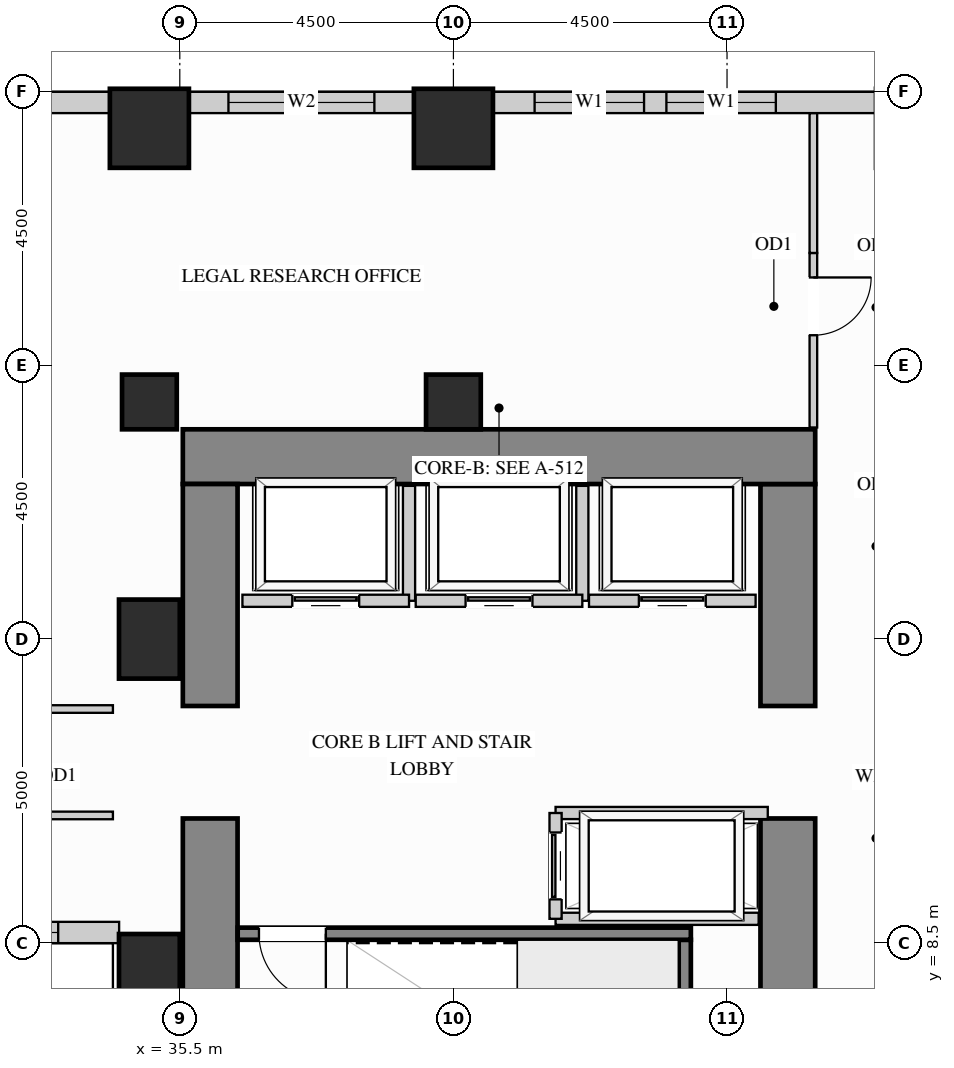
"""IFC4 building model, lengths in metres.
Left out: names, types, materials, properties, quantities, classifications, styles, units other than length and angle.
Written with IfcOpenShell. Run it as: python <this file> out.ifc"""

import sys

from ifc_helpers import new_model, si_unit, direction, frame, frame_2d, origin, origin_2d, place, context, subcontext, project, spatial, rectangle, extrude, source, transform, mapped, element, fill, save


model = new_model("IFC4")
c1 = context("Model", 3, precision=1e-05, world=origin(), true_north=direction((0.0, 1.0)))
c2 = subcontext(c1, "Body", "Model", "MODEL_VIEW")
j1 = project(units=[si_unit("LENGTHUNIT", "METRE"), si_unit("PLANEANGLEUNIT", "RADIAN")], contexts=[c1])
p1 = place(None, origin())
s1 = spatial("IfcSite", under=j1, at=p1, CompositionType="ELEMENT")
p2 = place(p1, origin())
s2 = spatial("IfcBuilding", under=s1, at=p2, CompositionType="ELEMENT")
p3 = place(p2, frame((0.0, 0.0, 69.3)))
s3 = spatial("IfcBuildingStorey", under=s2, at=p3, CompositionType="ELEMENT", Elevation=69.3)
m1 = source(origin(), c2, "Body", "SweptSolid", [
    extrude(rectangle(XDim=0.9, YDim=0.9, at=origin_2d()), origin(), (0.0, 0.0, 1.0), 3.32),
])
for number, where, z_axis, x_axis in (
    (1, (35.0, 17.4, 0.0), (0.0, 0.0, 1.0), (1.0, 0.0, 0.0)),
    (2, (40.0, 17.4, 0.0), (0.0, 0.0, 1.0), (1.0, 0.0, 0.0)),
):
    element("IfcColumn", number, at=place(p3, frame(where, z_axis=z_axis, x_axis=x_axis)), inside=s3, PredefinedType="COLUMN", context=c2, shape_type="MappedRepresentation", body=[
        mapped(m1, transform((0.0, 0.0, 0.0), x_axis=(1.0, 0.0, 0.0), y_axis=(0.0, 1.0, 0.0), z_axis=(0.0, 0.0, 1.0))),
    ])
m2 = source(origin(), c2, "Body", "SweptSolid", [
    extrude(rectangle(XDim=1.0, YDim=1.3, at=origin_2d()), origin(), (0.0, 0.0, 1.0), 3.32),
])
for number, where, z_axis, x_axis in (
    (3, (35.0, 13.5, 0.0), (0.0, 0.0, 1.0), (1.0, 0.0, 0.0)),
    (4, (35.0, 8.0, 0.0), (0.0, 0.0, 1.0), (1.0, 0.0, 0.0)),
):
    element("IfcColumn", number, at=place(p3, frame(where, z_axis=z_axis, x_axis=x_axis)), inside=s3, PredefinedType="COLUMN", context=c2, shape_type="MappedRepresentation", body=[
        mapped(m2, transform((0.0, 0.0, 0.0), x_axis=(1.0, 0.0, 0.0), y_axis=(0.0, 1.0, 0.0), z_axis=(0.0, 0.0, 1.0))),
    ])
m3 = source(origin(), c2, "Body", "SweptSolid", [
    extrude(rectangle(XDim=1.3, YDim=1.3, at=origin_2d()), origin(), (0.0, 0.0, 1.0), 3.32),
])
for number, where, z_axis, x_axis in (
    (5, (35.0, 21.9, 0.0), (0.0, 0.0, 1.0), (1.0, 0.0, 0.0)),
    (6, (40.0, 21.9, 0.0), (0.0, 0.0, 1.0), (1.0, 0.0, 0.0)),
):
    element("IfcColumn", number, at=place(p3, frame(where, z_axis=z_axis, x_axis=x_axis)), inside=s3, PredefinedType="COLUMN", context=c2, shape_type="MappedRepresentation", body=[
        mapped(m3, transform((0.0, 0.0, 0.0), x_axis=(1.0, 0.0, 0.0), y_axis=(0.0, 1.0, 0.0), z_axis=(0.0, 0.0, 1.0))),
    ])
m4 = source(origin(), c2, "Body", "SweptSolid", [
    extrude(rectangle(XDim=5.6, YDim=0.9, at=frame_2d((2.8, 0.0))), origin(), (0.0, 0.0, 1.0), 3.32),
])
p4 = place(p3, frame((45.5, 4.95, 0.0), z_axis=(0.0, 0.0, 1.0), x_axis=(0.0, 1.0, 0.0)))
e7 = element("IfcWall", 7, at=p4, inside=s3, PredefinedType="SHEAR", context=c2, shape_type="MappedRepresentation", body=[
    mapped(m4, transform((0.0, 0.0, 0.0), x_axis=(1.0, 0.0, 0.0), y_axis=(0.0, 1.0, 0.0), z_axis=(0.0, 0.0, 1.0))),
])
m5 = source(origin(), c2, "Body", "SweptSolid", [
    extrude(rectangle(XDim=3.65, YDim=0.9, at=frame_2d((1.825, 0.0))), origin(), (0.0, 0.0, 1.0), 3.32),
])
p5 = place(p3, frame((45.5, 12.4, 0.0), z_axis=(0.0, 0.0, 1.0), x_axis=(0.0, 1.0, 0.0)))
e8 = element("IfcWall", 8, at=p5, inside=s3, PredefinedType="SHEAR", context=c2, shape_type="MappedRepresentation", body=[
    mapped(m5, transform((0.0, 0.0, 0.0), x_axis=(1.0, 0.0, 0.0), y_axis=(0.0, 1.0, 0.0), z_axis=(0.0, 0.0, 1.0))),
])
m6 = source(origin(), c2, "Body", "SweptSolid", [
    extrude(rectangle(XDim=10.4, YDim=0.9, at=frame_2d((5.2, 0.0))), origin(), (0.0, 0.0, 1.0), 3.32),
])
p6 = place(p3, frame((35.55, 16.5, 0.0), z_axis=(0.0, 0.0, 1.0), x_axis=(1.0, 0.0, 0.0)))
e9 = element("IfcWall", 9, at=p6, inside=s3, PredefinedType="SHEAR", context=c2, shape_type="MappedRepresentation", body=[
    mapped(m6, transform((0.0, 0.0, 0.0), x_axis=(1.0, 0.0, 0.0), y_axis=(0.0, 1.0, 0.0), z_axis=(0.0, 0.0, 1.0))),
])
p7 = place(p3, frame((36.0, 4.95, 0.0), z_axis=(0.0, 0.0, 1.0), x_axis=(0.0, 1.0, 0.0)))
e10 = element("IfcWall", 10, at=p7, inside=s3, PredefinedType="SHEAR", context=c2, shape_type="MappedRepresentation", body=[
    mapped(m4, transform((0.0, 0.0, 0.0), x_axis=(1.0, 0.0, 0.0), y_axis=(0.0, 1.0, 0.0), z_axis=(0.0, 0.0, 1.0))),
])
p8 = place(p3, frame((36.0, 12.4, 0.0), z_axis=(0.0, 0.0, 1.0), x_axis=(0.0, 1.0, 0.0)))
e11 = element("IfcWall", 11, at=p8, inside=s3, PredefinedType="SHEAR", context=c2, shape_type="MappedRepresentation", body=[
    mapped(m5, transform((0.0, 0.0, 0.0), x_axis=(1.0, 0.0, 0.0), y_axis=(0.0, 1.0, 0.0), z_axis=(0.0, 0.0, 1.0))),
])
p9 = place(p3, frame((30.998, 8.675, 0.0), z_axis=(0.0, 0.0, 1.0), x_axis=(1.0, 0.0, 0.0)))
e12 = element("IfcWall", 12, at=p9, inside=s3, PredefinedType="SOLIDWALL", context=c2, shape_type="SweptSolid", body=[
    extrude(rectangle(XDim=3.504, YDim=0.35, at=frame_2d((1.752, 0.0))), origin(), (0.0, 0.0, 1.0), 3.305),
])
p10 = place(p9, frame((1.002, 0.0, 0.78)))
e13 = element("IfcOpeningElement", 13, at=p10, cuts=e12, PredefinedType="OPENING", context=c2, shape_type="SweptSolid", body=[
    extrude(rectangle(XDim=1.5, YDim=2.0, at=frame_2d((0.75, 1.0))), frame((0.0, 0.185, 0.0), z_axis=(0.0, -1.0, 0.0), x_axis=(1.0, 0.0, 0.0)), (0.0, 0.0, 1.0), 0.37),
])
p11 = place(p3, frame((46.952, 22.325, 0.0), z_axis=(0.0, 0.0, 1.0), x_axis=(-1.0, 0.0, 0.0)))
e14 = element("IfcWall", 14, at=p11, inside=s3, PredefinedType="SOLIDWALL", context=c2, shape_type="SweptSolid", body=[
    extrude(rectangle(XDim=6.304, YDim=0.35, at=frame_2d((3.152, 0.0))), origin(), (0.0, 0.0, 1.0), 2.45),
])
p12 = place(p11, frame((1.649, 0.0, 0.78)))
e15 = element("IfcOpeningElement", 15, at=p12, cuts=e14, PredefinedType="OPENING", context=c2, shape_type="SweptSolid", body=[
    extrude(rectangle(XDim=1.8, YDim=1.49, at=frame_2d((0.9, 0.745))), frame((0.0, 0.185, 0.0), z_axis=(0.0, -1.0, 0.0), x_axis=(1.0, 0.0, 0.0)), (0.0, 0.0, 1.0), 0.37),
])
p13 = place(p11, frame((3.817, 0.0, 0.78)))
e16 = element("IfcOpeningElement", 16, at=p13, cuts=e14, PredefinedType="OPENING", context=c2, shape_type="SweptSolid", body=[
    extrude(rectangle(XDim=1.8, YDim=1.49, at=frame_2d((0.9, 0.745))), frame((0.0, 0.185, 0.0), z_axis=(0.0, -1.0, 0.0), x_axis=(1.0, 0.0, 0.0)), (0.0, 0.0, 1.0), 0.37),
])
p14 = place(p3, frame((39.352, 22.325, 0.0), z_axis=(0.0, 0.0, 1.0), x_axis=(-1.0, 0.0, 0.0)))
e17 = element("IfcWall", 17, at=p14, inside=s3, PredefinedType="SOLIDWALL", context=c2, shape_type="SweptSolid", body=[
    extrude(rectangle(XDim=3.704, YDim=0.35, at=frame_2d((1.852, 0.0))), origin(), (0.0, 0.0, 1.0), 2.45),
])
p15 = place(p14, frame((0.652, 0.0, 0.78)))
e18 = element("IfcOpeningElement", 18, at=p15, cuts=e17, PredefinedType="OPENING", context=c2, shape_type="SweptSolid", body=[
    extrude(rectangle(XDim=2.4, YDim=1.49, at=frame_2d((1.2, 0.745))), frame((0.0, 0.185, 0.0), z_axis=(0.0, -1.0, 0.0), x_axis=(1.0, 0.0, 0.0)), (0.0, 0.0, 1.0), 0.37),
])
p16 = place(p3, frame((34.352, 22.325, 0.0), z_axis=(0.0, 0.0, 1.0), x_axis=(-1.0, 0.0, 0.0)))
e19 = element("IfcWall", 19, at=p16, inside=s3, PredefinedType="SOLIDWALL", context=c2, shape_type="SweptSolid", body=[
    extrude(rectangle(XDim=14.854, YDim=0.35, at=frame_2d((7.427, 0.0))), origin(), (0.0, 0.0, 1.0), 3.305),
])
p17 = place(p16, frame((4.058, 0.0, 0.78)))
e20 = element("IfcOpeningElement", 20, at=p17, cuts=e19, PredefinedType="OPENING", context=c2, shape_type="SweptSolid", body=[
    extrude(rectangle(XDim=1.5, YDim=2.0, at=frame_2d((0.75, 1.0))), frame((0.0, 0.185, 0.0), z_axis=(0.0, -1.0, 0.0), x_axis=(1.0, 0.0, 0.0)), (0.0, 0.0, 1.0), 0.37),
])
p18 = place(p16, frame((9.296, 0.0, 0.78)))
e21 = element("IfcOpeningElement", 21, at=p18, cuts=e19, PredefinedType="OPENING", context=c2, shape_type="SweptSolid", body=[
    extrude(rectangle(XDim=1.5, YDim=2.0, at=frame_2d((0.75, 1.0))), frame((0.0, 0.185, 0.0), z_axis=(0.0, -1.0, 0.0), x_axis=(1.0, 0.0, 0.0)), (0.0, 0.0, 1.0), 0.37),
])
p19 = place(p3, frame((45.92, 16.98, 0.0), z_axis=(0.0, 0.0, 1.0), x_axis=(0.0, 1.0, 0.0)))
e22 = element("IfcWall", 22, at=p19, inside=s3, PredefinedType="PARTITIONING", context=c2, shape_type="SweptSolid", body=[
    extrude(rectangle(XDim=2.87, YDim=0.125, at=frame_2d((1.435, 0.0))), origin(), (0.0, 0.0, 1.0), 3.305),
])
p20 = place(p19, frame((1.517, 0.0, 0.0)))
e23 = element("IfcOpeningElement", 23, at=p20, cuts=e22, PredefinedType="OPENING", context=c2, shape_type="SweptSolid", body=[
    extrude(rectangle(XDim=0.95, YDim=2.15, at=frame_2d((0.475, 1.075))), frame((0.0, 0.073, 0.0), z_axis=(0.0, -1.0, 0.0), x_axis=(1.0, 0.0, 0.0)), (0.0, 0.0, 1.0), 0.145),
])
m7 = source(origin(), c2, "Body", "SweptSolid", [
    extrude(rectangle(XDim=2.298, YDim=0.125, at=frame_2d((1.149, 0.0))), origin(), (0.0, 0.0, 1.0), 3.305),
])
p21 = place(p3, frame((45.92, 19.85, 0.0), z_axis=(0.0, 0.0, 1.0), x_axis=(0.0, 1.0, 0.0)))
e24 = element("IfcWall", 24, at=p21, inside=s3, PredefinedType="PARTITIONING", context=c2, shape_type="MappedRepresentation", body=[
    mapped(m7, transform((0.0, 0.0, 0.0), x_axis=(1.0, 0.0, 0.0), y_axis=(0.0, 1.0, 0.0), z_axis=(0.0, 0.0, 1.0))),
])
p22 = place(p3, frame((29.85, 12.35, 0.0), z_axis=(0.0, 0.0, 1.0), x_axis=(1.0, 0.0, 0.0)))
e25 = element("IfcWall", 25, at=p22, inside=s3, PredefinedType="PARTITIONING", context=c2, shape_type="SweptSolid", body=[
    extrude(rectangle(XDim=4.55, YDim=0.125, at=frame_2d((2.275, 0.0))), origin(), (0.0, 0.0, 1.0), 3.305),
])
p23 = place(p22, frame((1.8, 0.0, 0.0)))
e26 = element("IfcOpeningElement", 26, at=p23, cuts=e25, PredefinedType="OPENING", context=c2, shape_type="SweptSolid", body=[
    extrude(rectangle(XDim=0.95, YDim=2.15, at=frame_2d((0.475, 1.075))), frame((0.0, 0.073, 0.0), z_axis=(0.0, -1.0, 0.0), x_axis=(1.0, 0.0, 0.0)), (0.0, 0.0, 1.0), 0.145),
])
p24 = place(p3, frame((29.85, 10.6, 0.0), z_axis=(0.0, 0.0, 1.0), x_axis=(1.0, 0.0, 0.0)))
e27 = element("IfcWall", 27, at=p24, inside=s3, PredefinedType="PARTITIONING", context=c2, shape_type="SweptSolid", body=[
    extrude(rectangle(XDim=4.55, YDim=0.125, at=frame_2d((2.275, 0.0))), origin(), (0.0, 0.0, 1.0), 3.305),
])
p25 = place(p24, frame((1.8, 0.0, 0.0)))
e28 = element("IfcOpeningElement", 28, at=p25, cuts=e27, PredefinedType="OPENING", context=c2, shape_type="SweptSolid", body=[
    extrude(rectangle(XDim=0.95, YDim=2.15, at=frame_2d((0.475, 1.075))), frame((0.0, 0.073, 0.0), z_axis=(0.0, -1.0, 0.0), x_axis=(1.0, 0.0, 0.0)), (0.0, 0.0, 1.0), 0.145),
])
m8 = source(origin(), c2, "Body", "SweptSolid", [
    extrude(rectangle(XDim=1.89, YDim=0.2, at=frame_2d((0.945, 0.0))), origin(), (0.0, 0.0, 1.0), 3.305),
])
p26 = place(p3, frame((39.27, 14.13, 0.0), z_axis=(0.0, 0.0, 1.0), x_axis=(0.0, 1.0, 0.0)))
e29 = element("IfcWall", 29, at=p26, inside=s3, PredefinedType="PARTITIONING", context=c2, shape_type="MappedRepresentation", body=[
    mapped(m8, transform((0.0, 0.0, 0.0), x_axis=(1.0, 0.0, 0.0), y_axis=(0.0, 1.0, 0.0), z_axis=(0.0, 0.0, 1.0))),
])
p27 = place(p3, frame((36.53, 14.13, 0.0), z_axis=(0.0, 0.0, 1.0), x_axis=(1.0, 0.0, 0.0)))
e30 = element("IfcWall", 30, at=p27, inside=s3, PredefinedType="PARTITIONING", context=c2, shape_type="SweptSolid", body=[
    extrude(rectangle(XDim=2.74, YDim=0.2, at=frame_2d((1.37, 0.0))), origin(), (0.0, 0.0, 1.0), 3.305),
])
p28 = place(p27, frame((0.82, 0.0, 0.0)))
e31 = element("IfcOpeningElement", 31, at=p28, cuts=e30, PredefinedType="OPENING", context=c2, shape_type="SweptSolid", body=[
    extrude(rectangle(XDim=1.1, YDim=2.2, at=frame_2d((0.55, 1.1))), frame((0.0, 0.11, 0.0), z_axis=(0.0, -1.0, 0.0), x_axis=(1.0, 0.0, 0.0)), (0.0, 0.0, 1.0), 0.22),
])
p29 = place(p3, frame((42.12, 14.13, 0.0), z_axis=(0.0, 0.0, 1.0), x_axis=(0.0, 1.0, 0.0)))
e32 = element("IfcWall", 32, at=p29, inside=s3, PredefinedType="PARTITIONING", context=c2, shape_type="MappedRepresentation", body=[
    mapped(m8, transform((0.0, 0.0, 0.0), x_axis=(1.0, 0.0, 0.0), y_axis=(0.0, 1.0, 0.0), z_axis=(0.0, 0.0, 1.0))),
])
p30 = place(p3, frame((39.38, 14.13, 0.0), z_axis=(0.0, 0.0, 1.0), x_axis=(1.0, 0.0, 0.0)))
e33 = element("IfcWall", 33, at=p30, inside=s3, PredefinedType="PARTITIONING", context=c2, shape_type="SweptSolid", body=[
    extrude(rectangle(XDim=2.74, YDim=0.2, at=frame_2d((1.37, 0.0))), origin(), (0.0, 0.0, 1.0), 3.305),
])
p31 = place(p30, frame((0.82, 0.0, 0.0)))
e34 = element("IfcOpeningElement", 34, at=p31, cuts=e33, PredefinedType="OPENING", context=c2, shape_type="SweptSolid", body=[
    extrude(rectangle(XDim=1.1, YDim=2.2, at=frame_2d((0.55, 1.1))), frame((0.0, 0.11, 0.0), z_axis=(0.0, -1.0, 0.0), x_axis=(1.0, 0.0, 0.0)), (0.0, 0.0, 1.0), 0.22),
])
p32 = place(p3, frame((42.23, 14.13, 0.0), z_axis=(0.0, 0.0, 1.0), x_axis=(1.0, 0.0, 0.0)))
e35 = element("IfcWall", 35, at=p32, inside=s3, PredefinedType="PARTITIONING", context=c2, shape_type="SweptSolid", body=[
    extrude(rectangle(XDim=2.74, YDim=0.2, at=frame_2d((1.37, 0.0))), origin(), (0.0, 0.0, 1.0), 3.305),
])
p33 = place(p32, frame((0.82, 0.0, 0.0)))
e36 = element("IfcOpeningElement", 36, at=p33, cuts=e35, PredefinedType="OPENING", context=c2, shape_type="SweptSolid", body=[
    extrude(rectangle(XDim=1.1, YDim=2.2, at=frame_2d((0.55, 1.1))), frame((0.0, 0.11, 0.0), z_axis=(0.0, -1.0, 0.0), x_axis=(1.0, 0.0, 0.0)), (0.0, 0.0, 1.0), 0.22),
])
m9 = source(origin(), c2, "Body", "SweptSolid", [
    extrude(rectangle(XDim=3.49, YDim=0.2, at=frame_2d((1.745, 0.0))), origin(), (0.0, 0.0, 1.0), 3.305),
])
p34 = place(p3, frame((41.68, 10.64, 0.0), z_axis=(0.0, 0.0, 1.0), x_axis=(1.0, 0.0, 0.0)))
e37 = element("IfcWall", 37, at=p34, inside=s3, PredefinedType="PARTITIONING", context=c2, shape_type="MappedRepresentation", body=[
    mapped(m9, transform((0.0, 0.0, 0.0), x_axis=(1.0, 0.0, 0.0), y_axis=(0.0, 1.0, 0.0), z_axis=(0.0, 0.0, 1.0))),
])
m10 = source(origin(), c2, "Body", "SweptSolid", [
    extrude(rectangle(XDim=3.34, YDim=0.2, at=frame_2d((1.67, 0.0))), origin(), (0.0, 0.0, 1.0), 3.305),
])
p35 = place(p3, frame((41.68, 8.9, 0.0), z_axis=(0.0, 0.0, 1.0), x_axis=(1.0, 0.0, 0.0)))
e38 = element("IfcWall", 38, at=p35, inside=s3, PredefinedType="PARTITIONING", context=c2, shape_type="MappedRepresentation", body=[
    mapped(m10, transform((0.0, 0.0, 0.0), x_axis=(1.0, 0.0, 0.0), y_axis=(0.0, 1.0, 0.0), z_axis=(0.0, 0.0, 1.0))),
])
p36 = place(p3, frame((41.68, 8.9, 0.0), z_axis=(0.0, 0.0, 1.0), x_axis=(0.0, 1.0, 0.0)))
e39 = element("IfcWall", 39, at=p36, inside=s3, PredefinedType="PARTITIONING", context=c2, shape_type="SweptSolid", body=[
    extrude(rectangle(XDim=1.74, YDim=0.2, at=frame_2d((0.87, 0.0))), origin(), (0.0, 0.0, 1.0), 3.305),
])
p37 = place(p36, frame((0.32, 0.0, 0.0)))
e40 = element("IfcOpeningElement", 40, at=p37, cuts=e39, PredefinedType="OPENING", context=c2, shape_type="SweptSolid", body=[
    extrude(rectangle(XDim=1.1, YDim=2.2, at=frame_2d((0.55, 1.1))), frame((0.0, 0.11, 0.0), z_axis=(0.0, -1.0, 0.0), x_axis=(1.0, 0.0, 0.0)), (0.0, 0.0, 1.0), 0.22),
])
m11 = source(origin(), c2, "Body", "SweptSolid", [
    extrude(rectangle(XDim=3.603, YDim=0.2, at=frame_2d((1.802, 0.0))), origin(), (0.0, 0.0, 1.0), 3.32),
])
p38 = place(p3, frame((43.805, 4.952, 0.0), z_axis=(0.0, 0.0, 1.0), x_axis=(0.0, 1.0, 0.0)))
e41 = element("IfcWall", 41, at=p38, inside=s3, PredefinedType="SHEAR", context=c2, shape_type="MappedRepresentation", body=[
    mapped(m11, transform((0.0, 0.0, 0.0), x_axis=(1.0, 0.0, 0.0), y_axis=(0.0, 1.0, 0.0), z_axis=(0.0, 0.0, 1.0))),
])
p39 = place(p3, frame((36.452, 8.655, 0.0), z_axis=(0.0, 0.0, 1.0), x_axis=(1.0, 0.0, 0.0)))
e42 = element("IfcWall", 42, at=p39, inside=s3, PredefinedType="SHEAR", context=c2, shape_type="SweptSolid", body=[
    extrude(rectangle(XDim=7.453, YDim=0.2, at=frame_2d((3.727, 0.0))), origin(), (0.0, 0.0, 1.0), 3.32),
])
p40 = place(p39, frame((0.35, 0.0, 0.0)))
e43 = element("IfcOpeningElement", 43, at=p40, cuts=e42, PredefinedType="OPENING", context=c2, shape_type="SweptSolid", body=[
    extrude(rectangle(XDim=1.1, YDim=2.15, at=frame_2d((0.55, 1.075))), frame((0.0, 0.11, 0.0), z_axis=(0.0, -1.0, 0.0), x_axis=(1.0, 0.0, 0.0)), (0.0, 0.0, 1.0), 0.22),
])
m12 = source(origin(), c2, "Body", "SweptSolid", [
    extrude(rectangle(XDim=1.1, YDim=2.2, at=frame_2d((0.55, 1.1))), frame((0.0, 0.025, 0.0), z_axis=(0.0, -1.0, 0.0), x_axis=(1.0, 0.0, 0.0)), (0.0, 0.0, 1.0), 0.05),
])
p41 = place(p28, origin())
e44 = element("IfcDoor", 44, at=p41, inside=s3, OperationType="SLIDING_TO_LEFT", PredefinedType="DOOR", context=c2, shape_type="MappedRepresentation", body=[
    mapped(m12, transform((0.0, 0.0, 0.0), x_axis=(1.0, 0.0, 0.0), y_axis=(0.0, 1.0, 0.0), z_axis=(0.0, 0.0, 1.0))),
])
fill(e31, e44)
p42 = place(p31, origin())
e45 = element("IfcDoor", 45, at=p42, inside=s3, OperationType="SLIDING_TO_LEFT", PredefinedType="DOOR", context=c2, shape_type="MappedRepresentation", body=[
    mapped(m12, transform((0.0, 0.0, 0.0), x_axis=(1.0, 0.0, 0.0), y_axis=(0.0, 1.0, 0.0), z_axis=(0.0, 0.0, 1.0))),
])
fill(e34, e45)
p43 = place(p33, origin())
e46 = element("IfcDoor", 46, at=p43, inside=s3, OperationType="SLIDING_TO_LEFT", PredefinedType="DOOR", context=c2, shape_type="MappedRepresentation", body=[
    mapped(m12, transform((0.0, 0.0, 0.0), x_axis=(1.0, 0.0, 0.0), y_axis=(0.0, 1.0, 0.0), z_axis=(0.0, 0.0, 1.0))),
])
fill(e36, e46)
p44 = place(p37, origin())
e47 = element("IfcDoor", 47, at=p44, inside=s3, OperationType="SLIDING_TO_LEFT", PredefinedType="DOOR", context=c2, shape_type="MappedRepresentation", body=[
    mapped(m12, transform((0.0, 0.0, 0.0), x_axis=(1.0, 0.0, 0.0), y_axis=(0.0, 1.0, 0.0), z_axis=(0.0, 0.0, 1.0))),
])
fill(e40, e47)
m13 = source(origin(), c2, "Body", "SweptSolid", [
    extrude(rectangle(XDim=0.95, YDim=2.15, at=frame_2d((0.475, 1.075))), frame((0.0, 0.025, 0.0), z_axis=(0.0, -1.0, 0.0), x_axis=(1.0, 0.0, 0.0)), (0.0, 0.0, 1.0), 0.05),
])
p45 = place(p20, origin())
e48 = element("IfcDoor", 48, at=p45, inside=s3, OperationType="SINGLE_SWING_RIGHT", PredefinedType="DOOR", context=c2, shape_type="MappedRepresentation", body=[
    mapped(m13, transform((0.0, 0.0, 0.0), x_axis=(1.0, 0.0, 0.0), y_axis=(0.0, 1.0, 0.0), z_axis=(0.0, 0.0, 1.0))),
])
fill(e23, e48)
m14 = source(origin(), c2, "Body", "SweptSolid", [
    extrude(rectangle(XDim=1.1, YDim=2.15, at=frame_2d((0.55, 1.075))), frame((0.0, 0.025, 0.0), z_axis=(0.0, -1.0, 0.0), x_axis=(1.0, 0.0, 0.0)), (0.0, 0.0, 1.0), 0.05),
])
p46 = place(p40, origin())
e49 = element("IfcDoor", 49, at=p46, inside=s3, OperationType="SINGLE_SWING_RIGHT", PredefinedType="DOOR", context=c2, shape_type="MappedRepresentation", body=[
    mapped(m14, transform((0.0, 0.0, 0.0), x_axis=(1.0, 0.0, 0.0), y_axis=(0.0, 1.0, 0.0), z_axis=(0.0, 0.0, 1.0))),
])
fill(e43, e49)
m15 = source(origin(), c2, "Body", "SweptSolid", [
    extrude(rectangle(XDim=1.8, YDim=1.49, at=frame_2d((0.9, 0.745))), frame((0.0, 0.03, 0.0), z_axis=(0.0, -1.0, 0.0), x_axis=(1.0, 0.0, 0.0)), (0.0, 0.0, 1.0), 0.06),
])
p47 = place(p12, origin())
e50 = element("IfcWindow", 50, at=p47, inside=s3, PartitioningType="SINGLE_PANEL", PredefinedType="WINDOW", context=c2, shape_type="MappedRepresentation", body=[
    mapped(m15, transform((0.0, 0.0, 0.0), x_axis=(1.0, 0.0, 0.0), y_axis=(0.0, 1.0, 0.0), z_axis=(0.0, 0.0, 1.0))),
])
fill(e15, e50)
p48 = place(p13, origin())
e51 = element("IfcWindow", 51, at=p48, inside=s3, PartitioningType="SINGLE_PANEL", PredefinedType="WINDOW", context=c2, shape_type="MappedRepresentation", body=[
    mapped(m15, transform((0.0, 0.0, 0.0), x_axis=(1.0, 0.0, 0.0), y_axis=(0.0, 1.0, 0.0), z_axis=(0.0, 0.0, 1.0))),
])
fill(e16, e51)
m16 = source(origin(), c2, "Body", "SweptSolid", [
    extrude(rectangle(XDim=2.4, YDim=1.49, at=frame_2d((1.2, 0.745))), frame((0.0, 0.03, 0.0), z_axis=(0.0, -1.0, 0.0), x_axis=(1.0, 0.0, 0.0)), (0.0, 0.0, 1.0), 0.06),
])
p49 = place(p15, origin())
e52 = element("IfcWindow", 52, at=p49, inside=s3, PartitioningType="SINGLE_PANEL", PredefinedType="WINDOW", context=c2, shape_type="MappedRepresentation", body=[
    mapped(m16, transform((0.0, 0.0, 0.0), x_axis=(1.0, 0.0, 0.0), y_axis=(0.0, 1.0, 0.0), z_axis=(0.0, 0.0, 1.0))),
])
fill(e18, e52)
m17 = source(origin(), c2, "Body", "SweptSolid", [
    extrude(rectangle(XDim=1.5, YDim=2.0, at=frame_2d((0.75, 1.0))), frame((0.0, 0.03, 0.0), z_axis=(0.0, -1.0, 0.0), x_axis=(1.0, 0.0, 0.0)), (0.0, 0.0, 1.0), 0.06),
])
p50 = place(p10, origin())
e53 = element("IfcWindow", 53, at=p50, inside=s3, PartitioningType="SINGLE_PANEL", PredefinedType="WINDOW", context=c2, shape_type="MappedRepresentation", body=[
    mapped(m17, transform((0.0, 0.0, 0.0), x_axis=(1.0, 0.0, 0.0), y_axis=(0.0, 1.0, 0.0), z_axis=(0.0, 0.0, 1.0))),
])
fill(e13, e53)
save(model, sys.argv[1])
